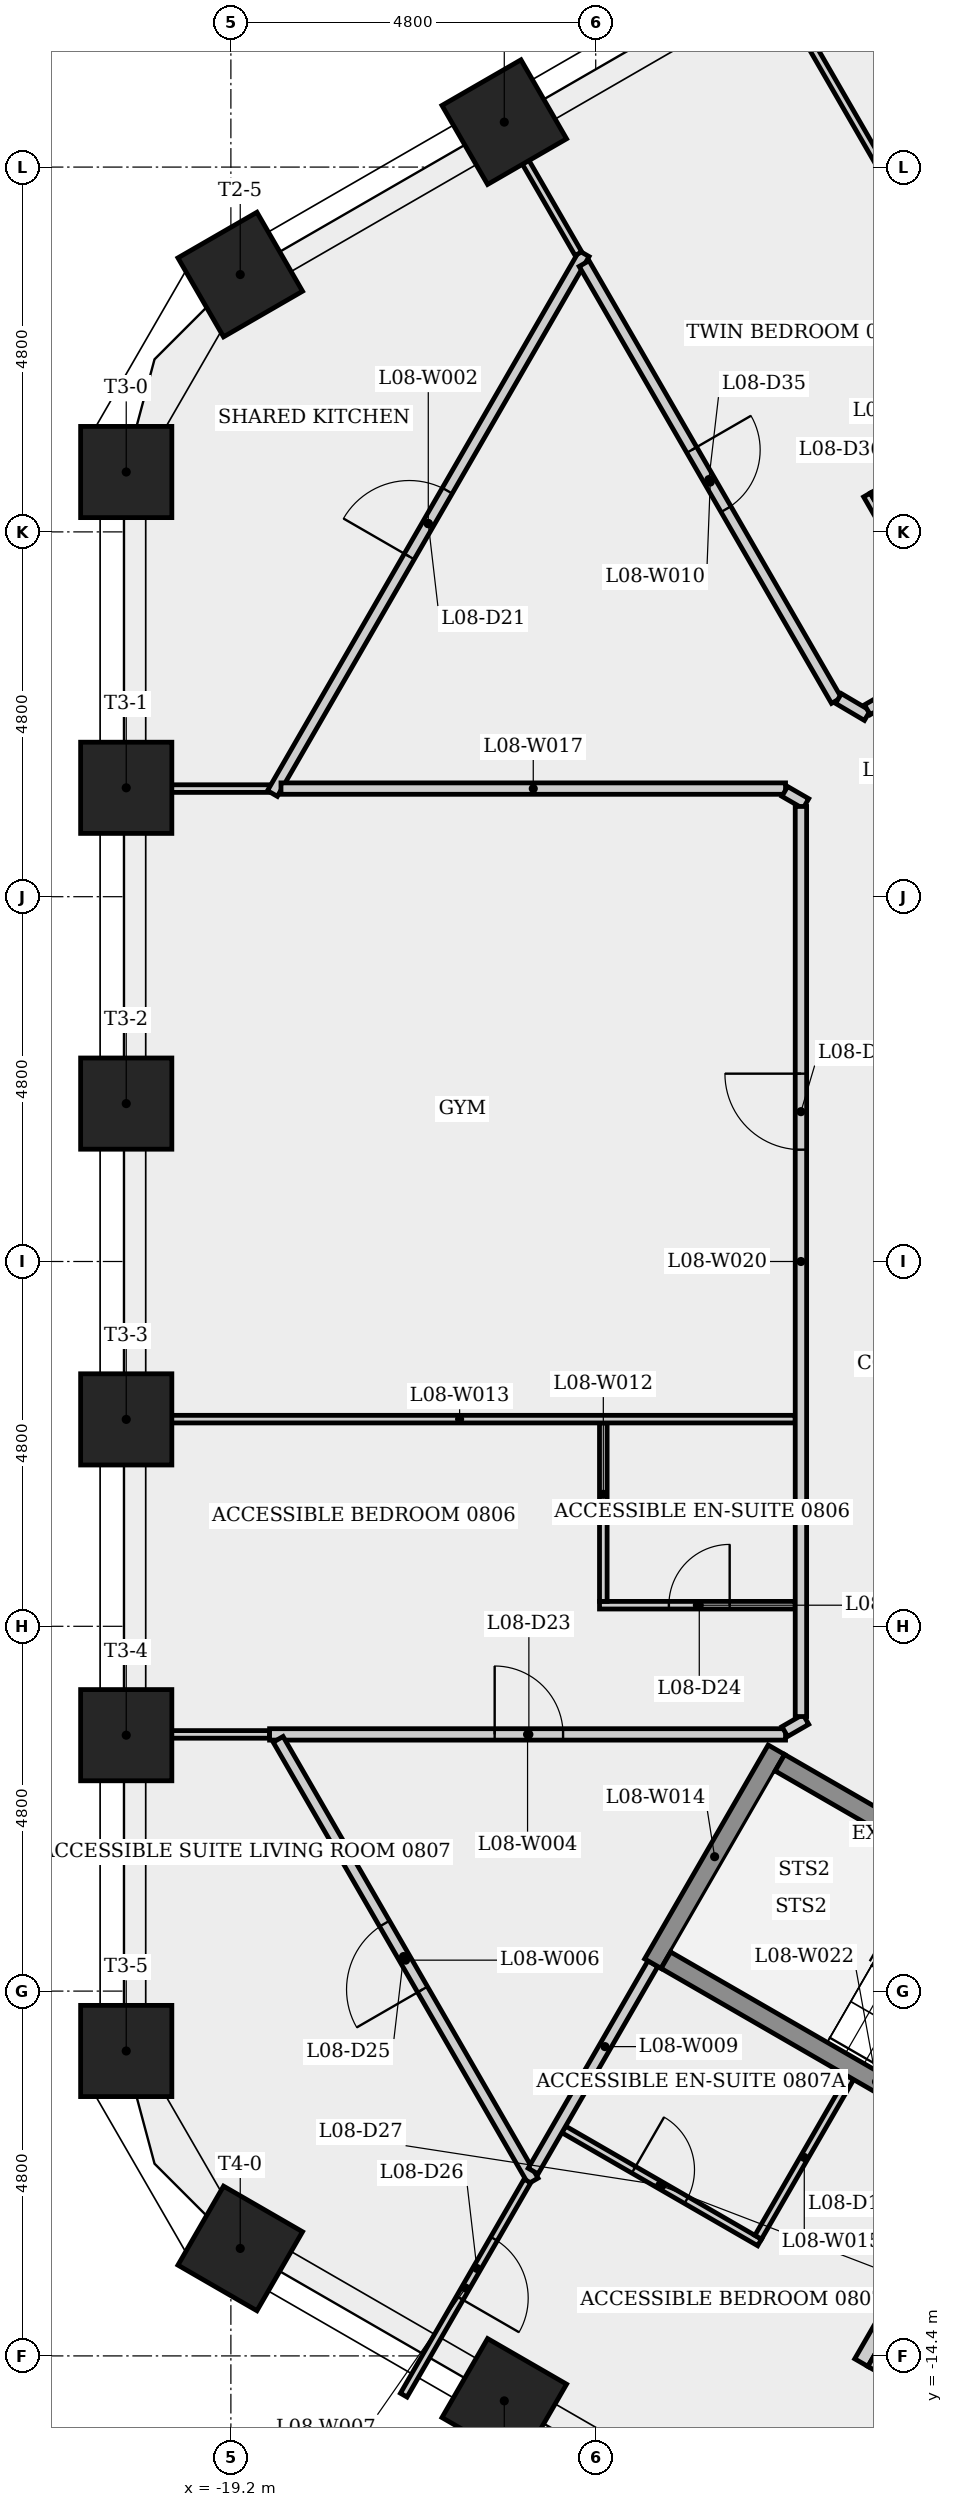
"""IFC4 building model, lengths in metres.
Left out: names, types, materials, properties, quantities, classifications, styles, units other than length and angle.
Written with IfcOpenShell. Run it as: python <this file> out.ifc"""

import sys

from ifc_helpers import new_model, si_unit, direction, frame, frame_2d, origin, origin_2d, place, context, subcontext, project, spatial, rectangle, extrude, element, fill, save


model = new_model("IFC4")
c1 = context("Model", 3, precision=1e-05, world=origin(), true_north=direction((0.0, 1.0)))
c2 = subcontext(c1, "Body", "Model", "MODEL_VIEW")
j1 = project(units=[si_unit("LENGTHUNIT", "METRE"), si_unit("PLANEANGLEUNIT", "RADIAN")], contexts=[c1])
p1 = place(None, origin())
s1 = spatial("IfcSite", under=j1, at=p1, CompositionType="ELEMENT")
p2 = place(p1, origin())
s2 = spatial("IfcBuilding", under=s1, at=p2, CompositionType="ELEMENT")
p3 = place(p2, frame((0.0, 0.0, 35.7)))
s3 = spatial("IfcBuildingStorey", under=s2, at=p3, CompositionType="ELEMENT", Elevation=35.7)
for number, where, z_axis, x_axis in (
    (1, (-15.603, 14.991, 0.0), (0.0, 0.0, 1.0), (-0.5, 0.866, 0.0)),
    (2, (-19.077, 12.986, 0.0), (0.0, 0.0, 1.0), (-0.5, 0.866, 0.0)),
    (3, (-20.577, 10.388, 0.0), (0.0, 0.0, 1.0), (-1.0, 0.0, 0.0)),
    (4, (-20.577, 6.233, 0.0), (0.0, 0.0, 1.0), (-1.0, 0.0, 0.0)),
    (5, (-20.577, 2.078, 0.0), (0.0, 0.0, 1.0), (-1.0, 0.0, 0.0)),
    (6, (-20.577, -2.078, 0.0), (0.0, 0.0, 1.0), (-1.0, 0.0, 0.0)),
    (7, (-20.577, -6.233, 0.0), (0.0, 0.0, 1.0), (-1.0, 0.0, 0.0)),
    (8, (-20.577, -10.388, 0.0), (0.0, 0.0, 1.0), (-1.0, 0.0, 0.0)),
    (9, (-19.077, -12.986, 0.0), (0.0, 0.0, 1.0), (-0.5, -0.866, 0.0)),
    (10, (-15.603, -14.991, 0.0), (0.0, 0.0, 1.0), (-0.5, -0.866, 0.0)),
):
    element("IfcColumn", number, at=place(p3, frame(where, z_axis=z_axis, x_axis=x_axis)), inside=s3, PredefinedType="COLUMN", context=c2, shape_type="SweptSolid", body=[
        extrude(rectangle(XDim=1.2, YDim=1.2, at=origin_2d()), origin(), (0.0, 0.0, 1.0), 3.4),
    ])
p4 = place(p3, frame((-18.691, 6.222, 0.0), z_axis=(0.0, 0.0, 1.0), x_axis=(-1.0, 0.0, 0.0)))
e11 = element("IfcWall", 11, at=p4, inside=s3, PredefinedType="PARTITIONING", context=c2, shape_type="SweptSolid", body=[
    extrude(rectangle(XDim=1.916, YDim=0.1, at=frame_2d((0.958, 0.0))), origin(), (0.0, 0.0, 1.0), 3.05),
])
p5 = place(p3, frame((-18.653, 6.157, 0.0), z_axis=(0.0, 0.0, 1.0), x_axis=(0.499990428537, 0.866030929801, 0.0)))
e12 = element("IfcWall", 12, at=p5, inside=s3, PredefinedType="PARTITIONING", context=c2, shape_type="SweptSolid", body=[
    extrude(rectangle(XDim=8.202, YDim=0.15, at=frame_2d((4.101, 0.0))), origin(), (0.0, 0.0, 1.0), 3.05),
])
p6 = place(p5, frame((3.601, 0.0, 0.0)))
e13 = element("IfcOpeningElement", 13, at=p6, cuts=e12, PredefinedType="OPENING", context=c2, shape_type="SweptSolid", body=[
    extrude(rectangle(XDim=1.0, YDim=2.1, at=frame_2d((0.5, 1.05))), frame((0.0, 0.085, 0.0), z_axis=(0.0, -1.0, 0.0), x_axis=(1.0, 0.0, 0.0)), (0.0, 0.0, 1.0), 0.17),
])
p7 = place(p3, frame((-18.691, -6.222, 0.0), z_axis=(0.0, 0.0, 1.0), x_axis=(-1.0, 0.0, 0.0)))
e14 = element("IfcWall", 14, at=p7, inside=s3, PredefinedType="PARTITIONING", context=c2, shape_type="SweptSolid", body=[
    extrude(rectangle(XDim=1.916, YDim=0.1, at=frame_2d((0.958, 0.0))), origin(), (0.0, 0.0, 1.0), 3.05),
])
p8 = place(p3, frame((-18.691, -6.222, 0.0), z_axis=(0.0, 0.0, 1.0), x_axis=(1.0, 0.0, 0.0)))
e15 = element("IfcWall", 15, at=p8, inside=s3, PredefinedType="PARTITIONING", context=c2, shape_type="SweptSolid", body=[
    extrude(rectangle(XDim=6.788, YDim=0.15, at=frame_2d((3.394, 0.0))), origin(), (0.0, 0.0, 1.0), 3.05),
])
p9 = place(p8, frame((2.961, 0.0, 0.0)))
e16 = element("IfcOpeningElement", 16, at=p9, cuts=e15, PredefinedType="OPENING", context=c2, shape_type="SweptSolid", body=[
    extrude(rectangle(XDim=0.9, YDim=2.1, at=frame_2d((0.45, 1.05))), frame((0.0, 0.085, 0.0), z_axis=(0.0, -1.0, 0.0), x_axis=(1.0, 0.0, 0.0)), (0.0, 0.0, 1.0), 0.17),
])
p10 = place(p3, frame((-15.621, 14.981, 0.0), z_axis=(0.0, 0.0, 1.0), x_axis=(0.499984821847, -0.866034166718, 0.0)))
e17 = element("IfcWall", 17, at=p10, inside=s3, PredefinedType="PARTITIONING", context=c2, shape_type="SweptSolid", body=[
    extrude(rectangle(XDim=1.987, YDim=0.1, at=frame_2d((0.993, 0.0))), origin(), (0.0, 0.0, 1.0), 3.05),
])
p11 = place(p3, frame((-15.224, -12.098, 0.0), z_axis=(0.0, 0.0, 1.0), x_axis=(-0.499985979596, 0.866033498317, 0.0)))
e18 = element("IfcWall", 18, at=p11, inside=s3, PredefinedType="PARTITIONING", context=c2, shape_type="SweptSolid", body=[
    extrude(rectangle(XDim=6.71, YDim=0.15, at=frame_2d((3.355, 0.0))), origin(), (0.0, 0.0, 1.0), 3.05),
])
p12 = place(p11, frame((2.91, 0.0, 0.0)))
e19 = element("IfcOpeningElement", 19, at=p12, cuts=e18, PredefinedType="OPENING", context=c2, shape_type="SweptSolid", body=[
    extrude(rectangle(XDim=1.0, YDim=2.1, at=frame_2d((0.5, 1.05))), frame((0.0, 0.085, 0.0), z_axis=(0.0, -1.0, 0.0), x_axis=(1.0, 0.0, 0.0)), (0.0, 0.0, 1.0), 0.17),
])
p13 = place(p3, frame((-15.299, -12.098, 0.0), z_axis=(0.0, 0.0, 1.0), x_axis=(-0.50003633994, -0.866004421894, 0.0)))
e20 = element("IfcWall", 20, at=p13, inside=s3, PredefinedType="PARTITIONING", context=c2, shape_type="SweptSolid", body=[
    extrude(rectangle(XDim=3.254, YDim=0.1, at=frame_2d((1.627, 0.0))), origin(), (0.0, 0.0, 1.0), 3.05),
])
p14 = place(p13, frame((0.879, 0.0, 0.0)))
e21 = element("IfcOpeningElement", 21, at=p14, cuts=e20, PredefinedType="OPENING", context=c2, shape_type="SweptSolid", body=[
    extrude(rectangle(XDim=0.9, YDim=2.1, at=frame_2d((0.45, 1.05))), frame((0.0, 0.06, 0.0), z_axis=(0.0, -1.0, 0.0), x_axis=(1.0, 0.0, 0.0)), (0.0, 0.0, 1.0), 0.12),
])
p15 = place(p3, frame((-14.82, -11.42, 0.0), z_axis=(0.0, 0.0, 1.0), x_axis=(0.866017493347, -0.500013701029, 0.0)))
e22 = element("IfcWall", 22, at=p15, inside=s3, PredefinedType="PARTITIONING", context=c2, shape_type="SweptSolid", body=[
    extrude(rectangle(XDim=2.975, YDim=0.1, at=frame_2d((1.488, 0.0))), origin(), (0.0, 0.0, 1.0), 3.05),
])
p16 = place(p15, frame((1.062, 0.0, 0.0)))
e23 = element("IfcOpeningElement", 23, at=p16, cuts=e22, PredefinedType="OPENING", context=c2, shape_type="SweptSolid", body=[
    extrude(rectangle(XDim=0.8, YDim=2.1, at=frame_2d((0.4, 1.05))), frame((0.0, 0.06, 0.0), z_axis=(0.0, -1.0, 0.0), x_axis=(1.0, 0.0, 0.0)), (0.0, 0.0, 1.0), 0.12),
])
p17 = place(p3, frame((-15.224, -11.968, 0.0), z_axis=(0.0, 0.0, 1.0), x_axis=(0.500013012896, 0.866017890655, 0.0)))
e24 = element("IfcWall", 24, at=p17, inside=s3, PredefinedType="PARTITIONING", context=c2, shape_type="SweptSolid", body=[
    extrude(rectangle(XDim=3.152, YDim=0.15, at=frame_2d((1.576, 0.0))), origin(), (0.0, 0.0, 1.0), 3.05),
])
p18 = place(p3, frame((-14.552, 13.131, 0.0), z_axis=(0.0, 0.0, 1.0), x_axis=(0.500011064058, -0.866019015853, 0.0)))
e25 = element("IfcWall", 25, at=p18, inside=s3, PredefinedType="PARTITIONING", context=c2, shape_type="SweptSolid", body=[
    extrude(rectangle(XDim=6.639, YDim=0.15, at=frame_2d((3.319, 0.0))), origin(), (0.0, 0.0, 1.0), 3.05),
])
p19 = place(p18, frame((2.832, 0.0, 0.0)))
e26 = element("IfcOpeningElement", 26, at=p19, cuts=e25, PredefinedType="OPENING", context=c2, shape_type="SweptSolid", body=[
    extrude(rectangle(XDim=0.9, YDim=2.1, at=frame_2d((0.45, 1.05))), frame((0.0, 0.085, 0.0), z_axis=(0.0, -1.0, 0.0), x_axis=(1.0, 0.0, 0.0)), (0.0, 0.0, 1.0), 0.17),
])
p20 = place(p3, frame((-14.35, -4.522, 0.0), z_axis=(0.0, 0.0, 1.0), x_axis=(1.0, 0.0, 0.0)))
e27 = element("IfcWall", 27, at=p20, inside=s3, PredefinedType="PARTITIONING", context=c2, shape_type="SweptSolid", body=[
    extrude(rectangle(XDim=2.575, YDim=0.1, at=frame_2d((1.288, 0.0))), origin(), (0.0, 0.0, 1.0), 3.05),
])
p21 = place(p20, frame((0.913, 0.0, 0.0)))
e28 = element("IfcOpeningElement", 28, at=p21, cuts=e27, PredefinedType="OPENING", context=c2, shape_type="SweptSolid", body=[
    extrude(rectangle(XDim=0.8, YDim=2.1, at=frame_2d((0.4, 1.05))), frame((0.0, 0.06, 0.0), z_axis=(0.0, -1.0, 0.0), x_axis=(1.0, 0.0, 0.0)), (0.0, 0.0, 1.0), 0.12),
])
p22 = place(p3, frame((-14.3, -2.124, 0.0), z_axis=(0.0, 0.0, 1.0), x_axis=(0.0, -1.0, 0.0)))
e29 = element("IfcWall", 29, at=p22, inside=s3, PredefinedType="PARTITIONING", context=c2, shape_type="SweptSolid", body=[
    extrude(rectangle(XDim=2.348, YDim=0.1, at=frame_2d((1.174, 0.0))), origin(), (0.0, 0.0, 1.0), 3.05),
])
p23 = place(p3, frame((-20.607, -2.074, 0.0), z_axis=(0.0, 0.0, 1.0), x_axis=(1.0, 0.0, 0.0)))
e30 = element("IfcWall", 30, at=p23, inside=s3, PredefinedType="PARTITIONING", context=c2, shape_type="SweptSolid", body=[
    extrude(rectangle(XDim=8.832, YDim=0.1, at=frame_2d((4.416, 0.0))), origin(), (0.0, 0.0, 1.0), 3.05),
])
p24 = place(p3, frame((-13.648, -9.239, 0.0), z_axis=(0.0, 0.0, 1.0), x_axis=(0.500017246033, 0.866015446554, 0.0)))
e31 = element("IfcWall", 31, at=p24, inside=s3, PredefinedType="SHEAR", context=c2, shape_type="SweptSolid", body=[
    extrude(rectangle(XDim=3.25, YDim=0.25, at=frame_2d((1.625, 0.0))), origin(), (0.0, 0.0, 1.0), 3.05),
])
p25 = place(p3, frame((-12.262, -12.839, 0.0), z_axis=(0.0, 0.0, 1.0), x_axis=(0.499972286653, 0.866041403502, 0.0)))
e32 = element("IfcWall", 32, at=p25, inside=s3, PredefinedType="PARTITIONING", context=c2, shape_type="SweptSolid", body=[
    extrude(rectangle(XDim=2.425, YDim=0.1, at=frame_2d((1.212, 0.0))), origin(), (0.0, 0.0, 1.0), 3.05),
])
p26 = place(p3, frame((-11.977, -6.595, 0.0), z_axis=(0.0, 0.0, 1.0), x_axis=(0.866025499775, -0.499999833739, 0.0)))
e33 = element("IfcWall", 33, at=p26, inside=s3, PredefinedType="SHEAR", context=c2, shape_type="SweptSolid", body=[
    extrude(rectangle(XDim=6.4, YDim=0.25, at=frame_2d((3.2, 0.0))), origin(), (0.0, 0.0, 1.0), 3.05),
])
p27 = place(p26, frame((5.025, 0.0, 0.0)))
e34 = element("IfcOpeningElement", 34, at=p27, cuts=e33, PredefinedType="OPENING", context=c2, shape_type="SweptSolid", body=[
    extrude(rectangle(XDim=1.0, YDim=2.1, at=frame_2d((0.5, 1.05))), frame((0.0, 0.135, 0.0), z_axis=(0.0, -1.0, 0.0), x_axis=(1.0, 0.0, 0.0)), (0.0, 0.0, 1.0), 0.27),
])
p28 = place(p3, frame((-11.903, 6.222, 0.0), z_axis=(0.0, 0.0, 1.0), x_axis=(-1.0, 0.0, 0.0)))
e35 = element("IfcWall", 35, at=p28, inside=s3, PredefinedType="PARTITIONING", context=c2, shape_type="SweptSolid", body=[
    extrude(rectangle(XDim=6.638, YDim=0.15, at=frame_2d((3.319, 0.0))), origin(), (0.0, 0.0, 1.0), 3.05),
])
for number, where, z_axis, x_axis in (
    (36, (-11.913, -6.185, 0.0), (0.0, 0.0, 1.0), (0.866, 0.5, 0.0)),
    (37, (-11.635, 6.025, 0.0), (0.0, 0.0, 1.0), (-0.866, 0.5, 0.0)),
):
    element("IfcWall", number, at=place(p3, frame(where, z_axis=z_axis, x_axis=x_axis)), inside=s3, PredefinedType="PARTITIONING", context=c2, shape_type="SweptSolid", body=[
        extrude(rectangle(XDim=0.321, YDim=0.15, at=frame_2d((0.16, 0.0))), origin(), (0.0, 0.0, 1.0), 3.05),
    ])
p29 = place(p3, frame((-11.7, -5.987, 0.0), z_axis=(0.0, 0.0, 1.0), x_axis=(0.0, 1.0, 0.0)))
e38 = element("IfcWall", 38, at=p29, inside=s3, PredefinedType="PARTITIONING", context=c2, shape_type="SweptSolid", body=[
    extrude(rectangle(XDim=11.975, YDim=0.15, at=frame_2d((5.987, 0.0))), origin(), (0.0, 0.0, 1.0), 3.05),
])
p30 = place(p29, frame((7.459, 0.0, 0.0)))
e39 = element("IfcOpeningElement", 39, at=p30, cuts=e38, PredefinedType="OPENING", context=c2, shape_type="SweptSolid", body=[
    extrude(rectangle(XDim=1.0, YDim=2.1, at=frame_2d((0.5, 1.05))), frame((0.0, 0.085, 0.0), z_axis=(0.0, -1.0, 0.0), x_axis=(1.0, 0.0, 0.0)), (0.0, 0.0, 1.0), 0.17),
])
p31 = place(p3, frame((-11.206, 7.408, 0.0), z_axis=(0.0, 0.0, 1.0), x_axis=(0.860849270889, -0.508860032631, 0.0)))
e40 = element("IfcWall", 40, at=p31, inside=s3, PredefinedType="PARTITIONING", context=c2, shape_type="SweptSolid", body=[
    extrude(rectangle(XDim=0.44, YDim=0.15, at=frame_2d((0.22, 0.0))), origin(), (0.0, 0.0, 1.0), 3.05),
])
p32 = place(p3, frame((-13.477, -9.193, 0.0), z_axis=(0.0, 0.0, 1.0), x_axis=(0.866025499775, -0.499999833739, 0.0)))
e41 = element("IfcWall", 41, at=p32, inside=s3, PredefinedType="SHEAR", context=c2, shape_type="SweptSolid", body=[
    extrude(rectangle(XDim=6.4, YDim=0.25, at=frame_2d((3.2, 0.0))), origin(), (0.0, 0.0, 1.0), 3.05),
])
p33 = place(p3, frame((-10.826, 7.26, 0.0), z_axis=(0.0, 0.0, 1.0), x_axis=(0.866022388473, 0.500005222637, 0.0)))
e42 = element("IfcWall", 42, at=p33, inside=s3, PredefinedType="PARTITIONING", context=c2, shape_type="SweptSolid", body=[
    extrude(rectangle(XDim=11.783, YDim=0.15, at=frame_2d((5.892, 0.0))), origin(), (0.0, 0.0, 1.0), 3.05),
])
p34 = place(p33, frame((5.89, 0.0, 0.0)))
e43 = element("IfcOpeningElement", 43, at=p34, cuts=e42, PredefinedType="OPENING", context=c2, shape_type="SweptSolid", body=[
    extrude(rectangle(XDim=1.0, YDim=2.1, at=frame_2d((0.5, 1.05))), frame((0.0, 0.085, 0.0), z_axis=(0.0, -1.0, 0.0), x_axis=(1.0, 0.0, 0.0)), (0.0, 0.0, 1.0), 0.17),
])
p35 = place(p3, frame((-10.905, -14.489, 0.0), z_axis=(0.0, 0.0, 1.0), x_axis=(0.499959856469, 0.866048579423, 0.0)))
e44 = element("IfcWall", 44, at=p35, inside=s3, PredefinedType="PLUMBINGWALL", context=c2, shape_type="SweptSolid", body=[
    extrude(rectangle(XDim=3.175, YDim=0.2, at=frame_2d((1.587, 0.0))), origin(), (0.0, 0.0, 1.0), 3.05),
])
p36 = place(p3, frame((-10.831, 10.086, 0.0), z_axis=(0.0, 0.0, 1.0), x_axis=(0.499986429846, -0.866033238375, 0.0)))
e45 = element("IfcWall", 45, at=p36, inside=s3, PredefinedType="PARTITIONING", context=c2, shape_type="SweptSolid", body=[
    extrude(rectangle(XDim=2.375, YDim=0.1, at=frame_2d((1.188, 0.0))), origin(), (0.0, 0.0, 1.0), 3.05),
])
p37 = place(p36, frame((0.812, 0.0, 0.0)))
e46 = element("IfcOpeningElement", 46, at=p37, cuts=e45, PredefinedType="OPENING", context=c2, shape_type="SweptSolid", body=[
    extrude(rectangle(XDim=0.8, YDim=2.1, at=frame_2d((0.4, 1.05))), frame((0.0, 0.06, 0.0), z_axis=(0.0, -1.0, 0.0), x_axis=(1.0, 0.0, 0.0)), (0.0, 0.0, 1.0), 0.12),
])
p38 = place(p3, frame((-8.863, -15.552, 0.0), z_axis=(0.0, 0.0, 1.0), x_axis=(-0.866035918664, 0.499981787252, 0.0)))
e47 = element("IfcWall", 47, at=p38, inside=s3, PredefinedType="PLUMBINGWALL", context=c2, shape_type="SweptSolid", body=[
    extrude(rectangle(XDim=2.2, YDim=0.2, at=frame_2d((1.1, 0.0))), origin(), (0.0, 0.0, 1.0), 3.05),
])
p39 = place(p3, frame((-8.836, 11.18, 0.0), z_axis=(0.0, 0.0, 1.0), x_axis=(-0.865999189711, -0.500045401358, 0.0)))
e48 = element("IfcWall", 48, at=p39, inside=s3, PredefinedType="PARTITIONING", context=c2, shape_type="SweptSolid", body=[
    extrude(rectangle(XDim=2.225, YDim=0.1, at=frame_2d((1.112, 0.0))), origin(), (0.0, 0.0, 1.0), 3.05),
])
p40 = place(p3, frame((-12.135, 16.994, 0.0), z_axis=(0.0, 0.0, 1.0), x_axis=(0.499997670926, -0.866026748472, 0.0)))
e49 = element("IfcWall", 49, at=p40, inside=s3, PredefinedType="PARTITIONING", context=c2, shape_type="SweptSolid", body=[
    extrude(rectangle(XDim=9.01, YDim=0.1, at=frame_2d((4.505, 0.0))), origin(), (0.0, 0.0, 1.0), 3.05),
])
p41 = place(p6, origin())
e50 = element("IfcDoor", 50, at=p41, inside=s3, OperationType="SINGLE_SWING_LEFT", PredefinedType="DOOR", context=c2, shape_type="SweptSolid", body=[
    extrude(rectangle(XDim=1.0, YDim=2.1, at=frame_2d((0.5, 1.05))), frame((0.0, 0.025, 0.0), z_axis=(0.0, -1.0, 0.0), x_axis=(1.0, 0.0, 0.0)), (0.0, 0.0, 1.0), 0.05),
])
fill(e13, e50)
p42 = place(p30, origin())
e51 = element("IfcDoor", 51, at=p42, inside=s3, OperationType="SINGLE_SWING_RIGHT", PredefinedType="DOOR", context=c2, shape_type="SweptSolid", body=[
    extrude(rectangle(XDim=1.0, YDim=2.1, at=frame_2d((0.5, 1.05))), frame((0.0, 0.025, 0.0), z_axis=(0.0, -1.0, 0.0), x_axis=(1.0, 0.0, 0.0)), (0.0, 0.0, 1.0), 0.05),
])
fill(e39, e51)
p43 = place(p9, origin())
e52 = element("IfcDoor", 52, at=p43, inside=s3, OperationType="SINGLE_SWING_LEFT", PredefinedType="DOOR", context=c2, shape_type="SweptSolid", body=[
    extrude(rectangle(XDim=0.9, YDim=2.1, at=frame_2d((0.45, 1.05))), frame((0.0, 0.025, 0.0), z_axis=(0.0, -1.0, 0.0), x_axis=(1.0, 0.0, 0.0)), (0.0, 0.0, 1.0), 0.05),
])
fill(e16, e52)
p44 = place(p21, origin())
e53 = element("IfcDoor", 53, at=p44, inside=s3, OperationType="SINGLE_SWING_RIGHT", PredefinedType="DOOR", context=c2, shape_type="SweptSolid", body=[
    extrude(rectangle(XDim=0.8, YDim=2.1, at=frame_2d((0.4, 1.05))), frame((0.0, 0.025, 0.0), z_axis=(0.0, -1.0, 0.0), x_axis=(1.0, 0.0, 0.0)), (0.0, 0.0, 1.0), 0.05),
])
fill(e28, e53)
p45 = place(p12, origin())
e54 = element("IfcDoor", 54, at=p45, inside=s3, OperationType="SINGLE_SWING_LEFT", PredefinedType="DOOR", context=c2, shape_type="SweptSolid", body=[
    extrude(rectangle(XDim=1.0, YDim=2.1, at=frame_2d((0.5, 1.05))), frame((0.0, 0.025, 0.0), z_axis=(0.0, -1.0, 0.0), x_axis=(1.0, 0.0, 0.0)), (0.0, 0.0, 1.0), 0.05),
])
fill(e19, e54)
p46 = place(p14, origin())
e55 = element("IfcDoor", 55, at=p46, inside=s3, OperationType="SINGLE_SWING_RIGHT", PredefinedType="DOOR", context=c2, shape_type="SweptSolid", body=[
    extrude(rectangle(XDim=0.9, YDim=2.1, at=frame_2d((0.45, 1.05))), frame((0.0, 0.025, 0.0), z_axis=(0.0, -1.0, 0.0), x_axis=(1.0, 0.0, 0.0)), (0.0, 0.0, 1.0), 0.05),
])
fill(e21, e55)
p47 = place(p16, origin())
e56 = element("IfcDoor", 56, at=p47, inside=s3, OperationType="SINGLE_SWING_LEFT", PredefinedType="DOOR", context=c2, shape_type="SweptSolid", body=[
    extrude(rectangle(XDim=0.8, YDim=2.1, at=frame_2d((0.4, 1.05))), frame((0.0, 0.025, 0.0), z_axis=(0.0, -1.0, 0.0), x_axis=(1.0, 0.0, 0.0)), (0.0, 0.0, 1.0), 0.05),
])
fill(e23, e56)
p48 = place(p19, origin())
e57 = element("IfcDoor", 57, at=p48, inside=s3, OperationType="SINGLE_SWING_LEFT", PredefinedType="DOOR", context=c2, shape_type="SweptSolid", body=[
    extrude(rectangle(XDim=0.9, YDim=2.1, at=frame_2d((0.45, 1.05))), frame((0.0, 0.025, 0.0), z_axis=(0.0, -1.0, 0.0), x_axis=(1.0, 0.0, 0.0)), (0.0, 0.0, 1.0), 0.05),
])
fill(e26, e57)
save(model, sys.argv[1])
